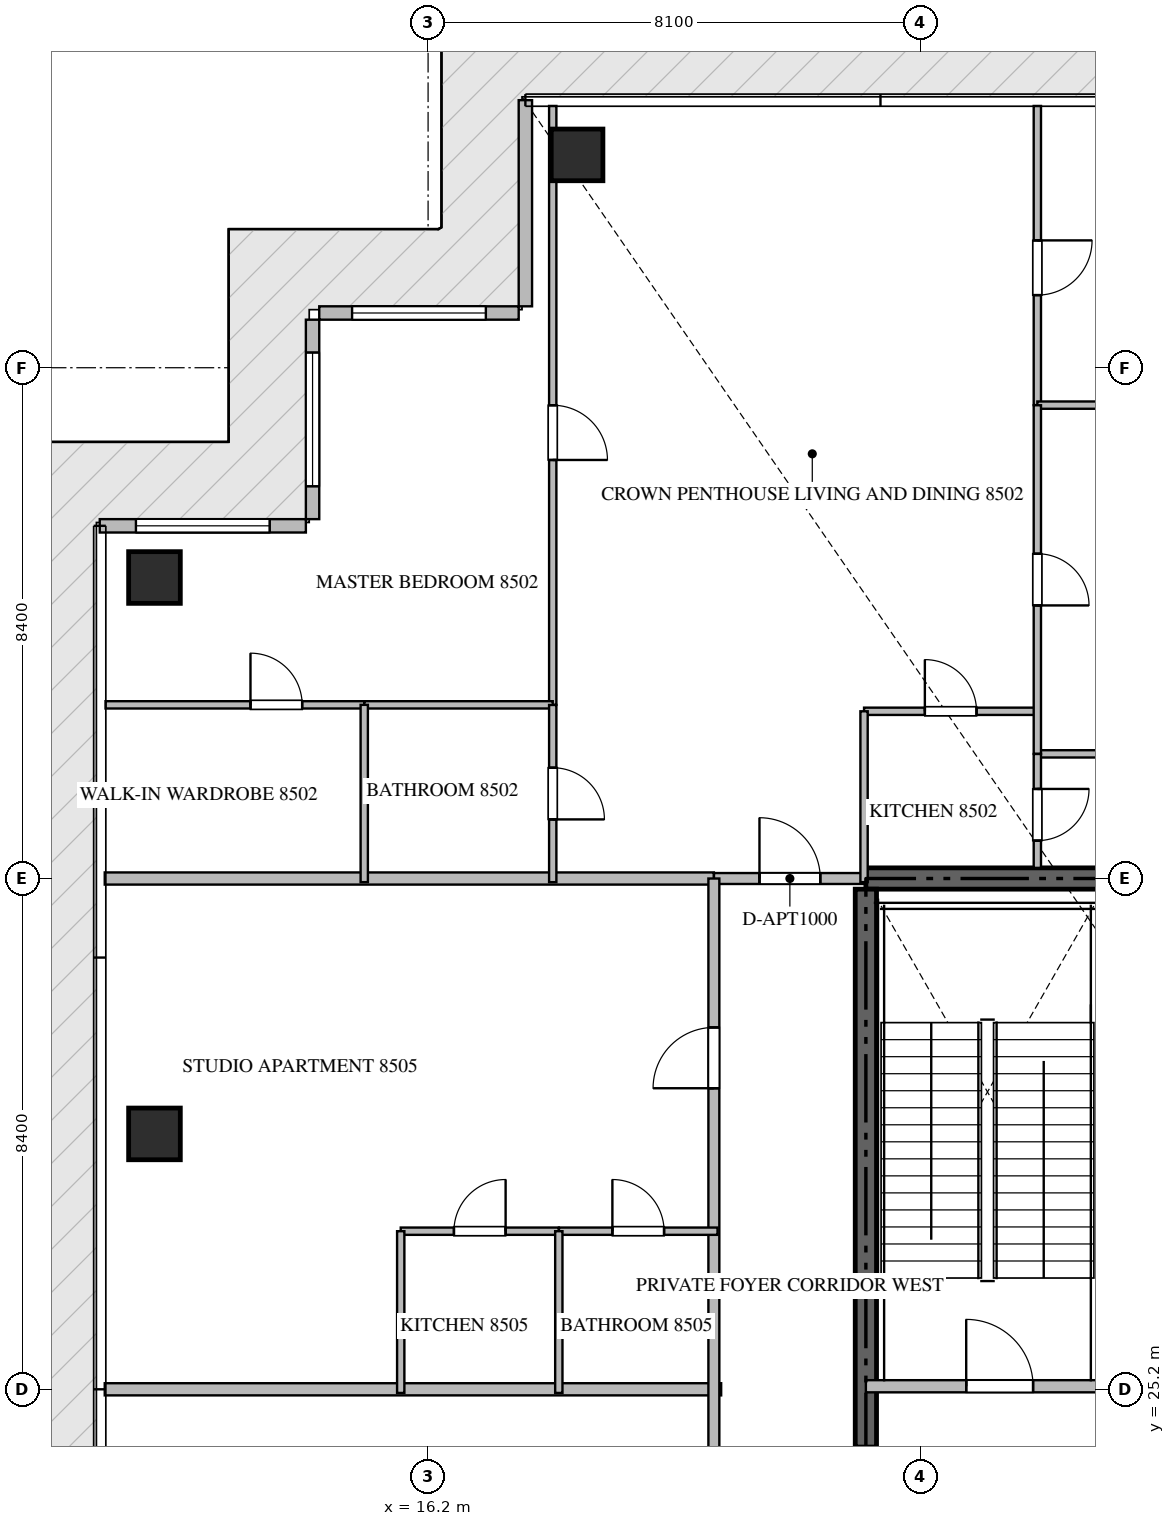
"""IFC4 building model, lengths in metres.
Left out: names, types, materials, properties, quantities, classifications, styles, units other than length and angle.
Written with IfcOpenShell. Run it as: python <this file> out.ifc"""

import sys

from ifc_helpers import new_model, si_unit, direction, frame, frame_2d, origin, origin_2d, place, context, subcontext, project, spatial, rectangle, extrude, source, transform, mapped, element, fill, save


model = new_model("IFC4")
c1 = context("Model", 3, precision=1e-05, world=origin(), true_north=direction((0.0, 1.0)))
c2 = subcontext(c1, "Body", "Model", "MODEL_VIEW")
j1 = project(units=[si_unit("LENGTHUNIT", "METRE"), si_unit("PLANEANGLEUNIT", "RADIAN")], contexts=[c1])
p1 = place(None, origin())
s1 = spatial("IfcSite", under=j1, at=p1, CompositionType="ELEMENT")
p2 = place(p1, origin())
s2 = spatial("IfcBuilding", under=s1, at=p2, CompositionType="ELEMENT")
p3 = place(p2, frame((0.0, 0.0, 342.05)))
s3 = spatial("IfcBuildingStorey", under=s2, at=p3, CompositionType="ELEMENT", Elevation=342.05)
p4 = place(p3, frame((41.4, 33.6, -0.26), z_axis=(0.0, 0.0, 1.0), x_axis=(-1.0, 0.0, 0.0)))
e1 = element("IfcWall", 1, at=p4, inside=s3, PredefinedType="SHEAR", context=c2, shape_type="SweptSolid", body=[
    extrude(rectangle(XDim=18.0, YDim=0.35, at=frame_2d((9.0, 0.0))), origin(), (0.0, 0.0, 1.0), 5.898),
])
p5 = place(p3, frame((23.4, 24.25, -0.26), z_axis=(0.0, 0.0, 1.0), x_axis=(0.0, 1.0, 0.0)))
e2 = element("IfcWall", 2, at=p5, inside=s3, PredefinedType="SHEAR", context=c2, shape_type="SweptSolid", body=[
    extrude(rectangle(XDim=9.175, YDim=0.35, at=frame_2d((4.587, 0.0))), origin(), (0.0, 0.0, 1.0), 5.898),
])
m1 = source(origin(), c2, "Body", "SweptSolid", [
    extrude(rectangle(XDim=0.85, YDim=0.85, at=origin_2d()), origin(), (0.0, 0.0, 1.0), 5.9),
])
for number, where, z_axis, x_axis in (
    (3, (18.65, 45.5, -0.26), (0.0, 0.0, 1.0), (1.0, 0.0, 0.0)),
    (4, (11.7, 29.4, -0.26), (0.0, 0.0, 1.0), (1.0, 0.0, 0.0)),
    (5, (11.7, 38.55, -0.26), (0.0, 0.0, 1.0), (1.0, 0.0, 0.0)),
):
    element("IfcColumn", number, at=place(p3, frame(where, z_axis=z_axis, x_axis=x_axis)), inside=s3, PredefinedType="COLUMN", context=c2, shape_type="MappedRepresentation", body=[
        mapped(m1, transform((0.0, 0.0, 0.0), scale=1.0)),
    ])
p6 = place(p3, frame((17.8, 46.4, 0.0), z_axis=(0.0, 0.0, 1.0), x_axis=(0.0, -1.0, 0.0)))
e6 = element("IfcWall", 6, at=p6, inside=s3, PredefinedType="ELEMENTEDWALL", context=c2, shape_type="SweptSolid", body=[
    extrude(rectangle(XDim=3.39, YDim=0.22, at=frame_2d((1.695, 0.0))), origin(), (0.0, 0.0, 1.0), 5.625),
])
p7 = place(p3, frame((17.69, 42.9, 0.0), z_axis=(0.0, 0.0, 1.0), x_axis=(-1.0, 0.0, 0.0)))
e7 = element("IfcWall", 7, at=p7, inside=s3, PredefinedType="ELEMENTEDWALL", context=c2, shape_type="SweptSolid", body=[
    extrude(rectangle(XDim=3.28, YDim=0.22, at=frame_2d((1.64, 0.0))), origin(), (0.0, 0.0, 1.0), 5.625),
])
p8 = place(p7, frame((0.54, 0.0, 0.65)))
e8 = element("IfcOpeningElement", 8, at=p8, cuts=e7, PredefinedType="OPENING", context=c2, shape_type="SweptSolid", body=[
    extrude(rectangle(XDim=2.2, YDim=2.4, at=frame_2d((1.1, 1.2))), frame((0.0, 0.12, 0.0), z_axis=(0.0, -1.0, 0.0), x_axis=(1.0, 0.0, 0.0)), (0.0, 0.0, 1.0), 0.24),
])
p9 = place(p3, frame((14.3, 42.79, 0.0), z_axis=(0.0, 0.0, 1.0), x_axis=(0.0, -1.0, 0.0)))
e9 = element("IfcWall", 9, at=p9, inside=s3, PredefinedType="ELEMENTEDWALL", context=c2, shape_type="SweptSolid", body=[
    extrude(rectangle(XDim=3.28, YDim=0.22, at=frame_2d((1.64, 0.0))), origin(), (0.0, 0.0, 1.0), 5.625),
])
p10 = place(p9, frame((0.54, 0.0, 0.65)))
e10 = element("IfcOpeningElement", 10, at=p10, cuts=e9, PredefinedType="OPENING", context=c2, shape_type="SweptSolid", body=[
    extrude(rectangle(XDim=2.2, YDim=2.4, at=frame_2d((1.1, 1.2))), frame((0.0, 0.12, 0.0), z_axis=(0.0, -1.0, 0.0), x_axis=(1.0, 0.0, 0.0)), (0.0, 0.0, 1.0), 0.24),
])
p11 = place(p3, frame((14.19, 39.4, 0.0), z_axis=(0.0, 0.0, 1.0), x_axis=(-1.0, 0.0, 0.0)))
e11 = element("IfcWall", 11, at=p11, inside=s3, PredefinedType="ELEMENTEDWALL", context=c2, shape_type="SweptSolid", body=[
    extrude(rectangle(XDim=3.39, YDim=0.22, at=frame_2d((1.695, 0.0))), origin(), (0.0, 0.0, 1.0), 5.625),
])
p12 = place(p11, frame((0.595, 0.0, 0.65)))
e12 = element("IfcOpeningElement", 12, at=p12, cuts=e11, PredefinedType="OPENING", context=c2, shape_type="SweptSolid", body=[
    extrude(rectangle(XDim=2.2, YDim=2.4, at=frame_2d((1.1, 1.2))), frame((0.0, 0.12, 0.0), z_axis=(0.0, -1.0, 0.0), x_axis=(1.0, 0.0, 0.0)), (0.0, 0.0, 1.0), 0.24),
])
p13 = place(p3, frame((23.4, 25.25, 0.0), z_axis=(0.0, 0.0, 1.0), x_axis=(1.0, 0.0, 0.0)))
e13 = element("IfcWall", 13, at=p13, inside=s3, PredefinedType="STANDARD", context=c2, shape_type="SweptSolid", body=[
    extrude(rectangle(XDim=4.45, YDim=0.2, at=frame_2d((2.225, 0.0))), origin(), (0.0, 0.0, 1.0), 5.64),
])
p14 = place(p13, frame((1.65, 0.0, 0.0)))
e14 = element("IfcOpeningElement", 14, at=p14, cuts=e13, PredefinedType="OPENING", context=c2, shape_type="SweptSolid", body=[
    extrude(rectangle(XDim=1.1, YDim=2.15, at=frame_2d((0.55, 1.075))), frame((0.0, 0.11, 0.0), z_axis=(0.0, -1.0, 0.0), x_axis=(1.0, 0.0, 0.0)), (0.0, 0.0, 1.0), 0.22),
])
p15 = place(p3, frame((10.882, 25.2, 0.0), z_axis=(0.0, 0.0, 1.0), x_axis=(1.0, 0.0, 0.0)))
e15 = element("IfcWall", 15, at=p15, inside=s3, PredefinedType="PARTITIONING", context=c2, shape_type="SweptSolid", body=[
    extrude(rectangle(XDim=10.138, YDim=0.2, at=frame_2d((5.069, 0.0))), origin(), (0.0, 0.0, 1.0), 5.64),
])
p16 = place(p3, frame((10.882, 33.6, 0.0), z_axis=(0.0, 0.0, 1.0), x_axis=(1.0, 0.0, 0.0)))
e16 = element("IfcWall", 16, at=p16, inside=s3, PredefinedType="PARTITIONING", context=c2, shape_type="SweptSolid", body=[
    extrude(rectangle(XDim=10.018, YDim=0.2, at=frame_2d((5.009, 0.0))), origin(), (0.0, 0.0, 1.0), 5.64),
])
p17 = place(p3, frame((20.902, 33.6, 0.0), z_axis=(0.0, 0.0, 1.0), x_axis=(1.0, 0.0, 0.0)))
e17 = element("IfcWall", 17, at=p17, inside=s3, PredefinedType="PARTITIONING", context=c2, shape_type="SweptSolid", body=[
    extrude(rectangle(XDim=2.496, YDim=0.18, at=frame_2d((1.248, 0.0))), origin(), (0.0, 0.0, 1.0), 5.64),
])
p18 = place(p17, frame((0.748, 0.0, 0.0)))
e18 = element("IfcOpeningElement", 18, at=p18, cuts=e17, PredefinedType="OPENING", context=c2, shape_type="SweptSolid", body=[
    extrude(rectangle(XDim=1.0, YDim=2.15, at=frame_2d((0.5, 1.075))), frame((0.0, 0.1, 0.0), z_axis=(0.0, -1.0, 0.0), x_axis=(1.0, 0.0, 0.0)), (0.0, 0.0, 1.0), 0.2),
])
p19 = place(p3, frame((20.9, 16.8, 0.0), z_axis=(0.0, 0.0, 1.0), x_axis=(0.0, 1.0, 0.0)))
e19 = element("IfcWall", 19, at=p19, inside=s3, PredefinedType="PARTITIONING", context=c2, shape_type="SweptSolid", body=[
    extrude(rectangle(XDim=16.8, YDim=0.18, at=frame_2d((8.4, 0.0))), origin(), (0.0, 0.0, 1.0), 5.64),
])
p20 = place(p19, frame((4.993, 0.0, 0.0)))
e20 = element("IfcOpeningElement", 20, at=p20, cuts=e19, PredefinedType="OPENING", context=c2, shape_type="SweptSolid", body=[
    extrude(rectangle(XDim=1.0, YDim=2.15, at=frame_2d((0.5, 1.075))), frame((0.0, 0.1, 0.0), z_axis=(0.0, -1.0, 0.0), x_axis=(1.0, 0.0, 0.0)), (0.0, 0.0, 1.0), 0.2),
])
p21 = place(p19, frame((13.351, 0.0, 0.0)))
e21 = element("IfcOpeningElement", 21, at=p21, cuts=e19, PredefinedType="OPENING", context=c2, shape_type="SweptSolid", body=[
    extrude(rectangle(XDim=1.0, YDim=2.15, at=frame_2d((0.5, 1.075))), frame((0.0, 0.1, 0.0), z_axis=(0.0, -1.0, 0.0), x_axis=(1.0, 0.0, 0.0)), (0.0, 0.0, 1.0), 0.2),
])
p22 = place(p3, frame((23.37, 36.35, 0.0), z_axis=(0.0, 0.0, 1.0), x_axis=(1.0, 0.0, 0.0)))
e22 = element("IfcWall", 22, at=p22, inside=s3, PredefinedType="PARTITIONING", context=c2, shape_type="SweptSolid", body=[
    extrude(rectangle(XDim=2.85, YDim=0.12, at=frame_2d((1.425, 0.0))), origin(), (0.0, 0.0, 1.0), 5.64),
])
p23 = place(p22, frame((1.0, 0.0, 0.0)))
e23 = element("IfcOpeningElement", 23, at=p23, cuts=e22, PredefinedType="OPENING", context=c2, shape_type="SweptSolid", body=[
    extrude(rectangle(XDim=0.85, YDim=2.1, at=frame_2d((0.425, 1.05))), frame((0.0, 0.07, 0.0), z_axis=(0.0, -1.0, 0.0), x_axis=(1.0, 0.0, 0.0)), (0.0, 0.0, 1.0), 0.14),
])
p24 = place(p3, frame((23.37, 36.35, 0.0), z_axis=(0.0, 0.0, 1.0), x_axis=(0.0, -1.0, 0.0)))
e24 = element("IfcWall", 24, at=p24, inside=s3, PredefinedType="PARTITIONING", context=c2, shape_type="SweptSolid", body=[
    extrude(rectangle(XDim=2.81, YDim=0.12, at=frame_2d((1.405, 0.0))), origin(), (0.0, 0.0, 1.0), 5.64),
])
p25 = place(p3, frame((18.25, 46.305, 0.0), z_axis=(0.0, 0.0, 1.0), x_axis=(0.0, -1.0, 0.0)))
e25 = element("IfcWall", 25, at=p25, inside=s3, PredefinedType="PARTITIONING", context=c2, shape_type="SweptSolid", body=[
    extrude(rectangle(XDim=9.849, YDim=0.12, at=frame_2d((4.924, 0.0))), origin(), (0.0, 0.0, 1.0), 5.64),
])
p26 = place(p25, frame((4.922, 0.0, 0.0)))
e26 = element("IfcOpeningElement", 26, at=p26, cuts=e25, PredefinedType="OPENING", context=c2, shape_type="SweptSolid", body=[
    extrude(rectangle(XDim=0.9, YDim=2.1, at=frame_2d((0.45, 1.05))), frame((0.0, 0.07, 0.0), z_axis=(0.0, -1.0, 0.0), x_axis=(1.0, 0.0, 0.0)), (0.0, 0.0, 1.0), 0.14),
])
p27 = place(p3, frame((10.895, 36.456, 0.0), z_axis=(0.0, 0.0, 1.0), x_axis=(1.0, 0.0, 0.0)))
e27 = element("IfcWall", 27, at=p27, inside=s3, PredefinedType="PARTITIONING", context=c2, shape_type="SweptSolid", body=[
    extrude(rectangle(XDim=4.255, YDim=0.12, at=frame_2d((2.127, 0.0))), origin(), (0.0, 0.0, 1.0), 5.64),
])
p28 = place(p27, frame((2.384, 0.0, 0.0)))
e28 = element("IfcOpeningElement", 28, at=p28, cuts=e27, PredefinedType="OPENING", context=c2, shape_type="SweptSolid", body=[
    extrude(rectangle(XDim=0.85, YDim=2.1, at=frame_2d((0.425, 1.05))), frame((0.0, 0.07, 0.0), z_axis=(0.0, -1.0, 0.0), x_axis=(1.0, 0.0, 0.0)), (0.0, 0.0, 1.0), 0.14),
])
p29 = place(p3, frame((15.152, 36.456, 0.0), z_axis=(0.0, 0.0, 1.0), x_axis=(1.0, 0.0, 0.0)))
e29 = element("IfcWall", 29, at=p29, inside=s3, PredefinedType="PARTITIONING", context=c2, shape_type="SweptSolid", body=[
    extrude(rectangle(XDim=3.098, YDim=0.12, at=frame_2d((1.549, 0.0))), origin(), (0.0, 0.0, 1.0), 5.64),
])
p30 = place(p3, frame((15.15, 36.456, 0.0), z_axis=(0.0, 0.0, 1.0), x_axis=(0.0, -1.0, 0.0)))
e30 = element("IfcWall", 30, at=p30, inside=s3, PredefinedType="PARTITIONING", context=c2, shape_type="SweptSolid", body=[
    extrude(rectangle(XDim=2.916, YDim=0.12, at=frame_2d((1.458, 0.0))), origin(), (0.0, 0.0, 1.0), 5.64),
])
p31 = place(p3, frame((18.25, 36.454, 0.0), z_axis=(0.0, 0.0, 1.0), x_axis=(0.0, -1.0, 0.0)))
e31 = element("IfcWall", 31, at=p31, inside=s3, PredefinedType="PARTITIONING", context=c2, shape_type="SweptSolid", body=[
    extrude(rectangle(XDim=2.914, YDim=0.12, at=frame_2d((1.457, 0.0))), origin(), (0.0, 0.0, 1.0), 5.64),
])
p32 = place(p31, frame((1.032, 0.0, 0.0)))
e32 = element("IfcOpeningElement", 32, at=p32, cuts=e31, PredefinedType="OPENING", context=c2, shape_type="SweptSolid", body=[
    extrude(rectangle(XDim=0.85, YDim=2.1, at=frame_2d((0.425, 1.05))), frame((0.0, 0.07, 0.0), z_axis=(0.0, -1.0, 0.0), x_axis=(1.0, 0.0, 0.0)), (0.0, 0.0, 1.0), 0.14),
])
p33 = place(p3, frame((26.22, 46.305, 0.0), z_axis=(0.0, 0.0, 1.0), x_axis=(0.0, -1.0, 0.0)))
e33 = element("IfcWall", 33, at=p33, inside=s3, PredefinedType="PARTITIONING", context=c2, shape_type="SweptSolid", body=[
    extrude(rectangle(XDim=4.92, YDim=0.12, at=frame_2d((2.46, 0.0))), origin(), (0.0, 0.0, 1.0), 5.64),
])
p34 = place(p33, frame((2.211, 0.0, 0.0)))
e34 = element("IfcOpeningElement", 34, at=p34, cuts=e33, PredefinedType="OPENING", context=c2, shape_type="SweptSolid", body=[
    extrude(rectangle(XDim=0.9, YDim=2.1, at=frame_2d((0.45, 1.05))), frame((0.0, 0.07, 0.0), z_axis=(0.0, -1.0, 0.0), x_axis=(1.0, 0.0, 0.0)), (0.0, 0.0, 1.0), 0.14),
])
for number, where, z_axis, x_axis in (
    (35, (26.22, 41.385, 0.0), (0.0, 0.0, 1.0), (1.0, 0.0, 0.0)),
    (36, (26.22, 35.65, 0.0), (0.0, 0.0, 1.0), (1.0, 0.0, 0.0)),
):
    element("IfcWall", number, at=place(p3, frame(where, z_axis=z_axis, x_axis=x_axis)), inside=s3, PredefinedType="PARTITIONING", context=c2, shape_type="SweptSolid", body=[
        extrude(rectangle(XDim=6.24, YDim=0.12, at=frame_2d((3.12, 0.0))), origin(), (0.0, 0.0, 1.0), 5.64),
    ])
p35 = place(p3, frame((26.22, 41.383, 0.0), z_axis=(0.0, 0.0, 1.0), x_axis=(0.0, -1.0, 0.0)))
e37 = element("IfcWall", 37, at=p35, inside=s3, PredefinedType="PARTITIONING", context=c2, shape_type="SweptSolid", body=[
    extrude(rectangle(XDim=5.733, YDim=0.12, at=frame_2d((2.867, 0.0))), origin(), (0.0, 0.0, 1.0), 5.64),
])
p36 = place(p35, frame((2.442, 0.0, 0.0)))
e38 = element("IfcOpeningElement", 38, at=p36, cuts=e37, PredefinedType="OPENING", context=c2, shape_type="SweptSolid", body=[
    extrude(rectangle(XDim=0.85, YDim=2.1, at=frame_2d((0.425, 1.05))), frame((0.0, 0.07, 0.0), z_axis=(0.0, -1.0, 0.0), x_axis=(1.0, 0.0, 0.0)), (0.0, 0.0, 1.0), 0.14),
])
p37 = place(p3, frame((26.22, 35.648, 0.0), z_axis=(0.0, 0.0, 1.0), x_axis=(0.0, -1.0, 0.0)))
e39 = element("IfcWall", 39, at=p37, inside=s3, PredefinedType="PARTITIONING", context=c2, shape_type="SweptSolid", body=[
    extrude(rectangle(XDim=1.873, YDim=0.12, at=frame_2d((0.937, 0.0))), origin(), (0.0, 0.0, 1.0), 5.64),
])
p38 = place(p37, frame((0.575, 0.0, 0.0)))
e40 = element("IfcOpeningElement", 40, at=p38, cuts=e39, PredefinedType="OPENING", context=c2, shape_type="SweptSolid", body=[
    extrude(rectangle(XDim=0.85, YDim=2.1, at=frame_2d((0.425, 1.05))), frame((0.0, 0.07, 0.0), z_axis=(0.0, -1.0, 0.0), x_axis=(1.0, 0.0, 0.0)), (0.0, 0.0, 1.0), 0.14),
])
p39 = place(p3, frame((15.75, 27.8, 0.0), z_axis=(0.0, 0.0, 1.0), x_axis=(1.0, 0.0, 0.0)))
e41 = element("IfcWall", 41, at=p39, inside=s3, PredefinedType="PARTITIONING", context=c2, shape_type="SweptSolid", body=[
    extrude(rectangle(XDim=2.6, YDim=0.12, at=frame_2d((1.3, 0.0))), origin(), (0.0, 0.0, 1.0), 5.64),
])
p40 = place(p39, frame((0.875, 0.0, 0.0)))
e42 = element("IfcOpeningElement", 42, at=p40, cuts=e41, PredefinedType="OPENING", context=c2, shape_type="SweptSolid", body=[
    extrude(rectangle(XDim=0.85, YDim=2.1, at=frame_2d((0.425, 1.05))), frame((0.0, 0.07, 0.0), z_axis=(0.0, -1.0, 0.0), x_axis=(1.0, 0.0, 0.0)), (0.0, 0.0, 1.0), 0.14),
])
p41 = place(p3, frame((18.352, 27.8, 0.0), z_axis=(0.0, 0.0, 1.0), x_axis=(1.0, 0.0, 0.0)))
e43 = element("IfcWall", 43, at=p41, inside=s3, PredefinedType="PARTITIONING", context=c2, shape_type="SweptSolid", body=[
    extrude(rectangle(XDim=2.608, YDim=0.12, at=frame_2d((1.304, 0.0))), origin(), (0.0, 0.0, 1.0), 5.64),
])
p42 = place(p41, frame((0.879, 0.0, 0.0)))
e44 = element("IfcOpeningElement", 44, at=p42, cuts=e43, PredefinedType="OPENING", context=c2, shape_type="SweptSolid", body=[
    extrude(rectangle(XDim=0.85, YDim=2.1, at=frame_2d((0.425, 1.05))), frame((0.0, 0.07, 0.0), z_axis=(0.0, -1.0, 0.0), x_axis=(1.0, 0.0, 0.0)), (0.0, 0.0, 1.0), 0.14),
])
for number, where, z_axis, x_axis in (
    (45, (18.35, 25.14, 0.0), (0.0, 0.0, 1.0), (0.0, 1.0, 0.0)),
    (46, (15.75, 25.14, 0.0), (0.0, 0.0, 1.0), (0.0, 1.0, 0.0)),
):
    element("IfcWall", number, at=place(p3, frame(where, z_axis=z_axis, x_axis=x_axis)), inside=s3, PredefinedType="PARTITIONING", context=c2, shape_type="SweptSolid", body=[
        extrude(rectangle(XDim=2.66, YDim=0.12, at=frame_2d((1.33, 0.0))), origin(), (0.0, 0.0, 1.0), 5.64),
    ])
m2 = source(origin(), c2, "Body", "SweptSolid", [
    extrude(rectangle(XDim=2.2, YDim=2.4, at=frame_2d((1.1, 1.2))), frame((0.0, 0.03, 0.0), z_axis=(0.0, -1.0, 0.0), x_axis=(1.0, 0.0, 0.0)), (0.0, 0.0, 1.0), 0.06),
])
p43 = place(p8, origin())
e47 = element("IfcWindow", 47, at=p43, inside=s3, PartitioningType="SINGLE_PANEL", PredefinedType="WINDOW", context=c2, shape_type="MappedRepresentation", body=[
    mapped(m2, transform((0.0, 0.0, 0.0), scale=1.0)),
])
fill(e8, e47)
p44 = place(p10, origin())
e48 = element("IfcWindow", 48, at=p44, inside=s3, PartitioningType="SINGLE_PANEL", PredefinedType="WINDOW", context=c2, shape_type="MappedRepresentation", body=[
    mapped(m2, transform((0.0, 0.0, 0.0), scale=1.0)),
])
fill(e10, e48)
p45 = place(p12, origin())
e49 = element("IfcWindow", 49, at=p45, inside=s3, PartitioningType="SINGLE_PANEL", PredefinedType="WINDOW", context=c2, shape_type="MappedRepresentation", body=[
    mapped(m2, transform((0.0, 0.0, 0.0), scale=1.0)),
])
fill(e12, e49)
m3 = source(origin(), c2, "Body", "SweptSolid", [
    extrude(rectangle(XDim=1.1, YDim=2.15, at=frame_2d((0.55, 1.075))), frame((0.0, 0.025, 0.0), z_axis=(0.0, -1.0, 0.0), x_axis=(1.0, 0.0, 0.0)), (0.0, 0.0, 1.0), 0.05),
])
p46 = place(p14, origin())
e50 = element("IfcDoor", 50, at=p46, inside=s3, OperationType="SINGLE_SWING_LEFT", PredefinedType="DOOR", context=c2, shape_type="MappedRepresentation", body=[
    mapped(m3, transform((0.0, 0.0, 0.0), scale=1.0)),
])
fill(e14, e50)
m4 = source(origin(), c2, "Body", "SweptSolid", [
    extrude(rectangle(XDim=1.0, YDim=2.15, at=frame_2d((0.5, 1.075))), frame((0.0, 0.025, 0.0), z_axis=(0.0, -1.0, 0.0), x_axis=(1.0, 0.0, 0.0)), (0.0, 0.0, 1.0), 0.05),
])
p47 = place(p18, origin())
e51 = element("IfcDoor", 51, at=p47, inside=s3, OperationType="SINGLE_SWING_LEFT", PredefinedType="DOOR", context=c2, shape_type="MappedRepresentation", body=[
    mapped(m4, transform((0.0, 0.0, 0.0), scale=1.0)),
])
fill(e18, e51)
p48 = place(p21, origin())
e52 = element("IfcDoor", 52, at=p48, inside=s3, OperationType="SINGLE_SWING_LEFT", PredefinedType="DOOR", context=c2, shape_type="MappedRepresentation", body=[
    mapped(m4, transform((0.0, 0.0, 0.0), scale=1.0)),
])
fill(e21, e52)
m5 = source(origin(), c2, "Body", "SweptSolid", [
    extrude(rectangle(XDim=0.85, YDim=2.1, at=frame_2d((0.425, 1.05))), frame((0.0, 0.025, 0.0), z_axis=(0.0, -1.0, 0.0), x_axis=(1.0, 0.0, 0.0)), (0.0, 0.0, 1.0), 0.05),
])
p49 = place(p23, origin())
e53 = element("IfcDoor", 53, at=p49, inside=s3, OperationType="SINGLE_SWING_LEFT", PredefinedType="DOOR", context=c2, shape_type="MappedRepresentation", body=[
    mapped(m5, transform((0.0, 0.0, 0.0), scale=1.0)),
])
fill(e23, e53)
m6 = source(origin(), c2, "Body", "SweptSolid", [
    extrude(rectangle(XDim=0.9, YDim=2.1, at=frame_2d((0.45, 1.05))), frame((0.0, 0.025, 0.0), z_axis=(0.0, -1.0, 0.0), x_axis=(1.0, 0.0, 0.0)), (0.0, 0.0, 1.0), 0.05),
])
p50 = place(p26, origin())
e54 = element("IfcDoor", 54, at=p50, inside=s3, OperationType="SINGLE_SWING_RIGHT", PredefinedType="DOOR", context=c2, shape_type="MappedRepresentation", body=[
    mapped(m6, transform((0.0, 0.0, 0.0), scale=1.0)),
])
fill(e26, e54)
p51 = place(p28, origin())
e55 = element("IfcDoor", 55, at=p51, inside=s3, OperationType="SINGLE_SWING_LEFT", PredefinedType="DOOR", context=c2, shape_type="MappedRepresentation", body=[
    mapped(m5, transform((0.0, 0.0, 0.0), scale=1.0)),
])
fill(e28, e55)
p52 = place(p32, origin())
e56 = element("IfcDoor", 56, at=p52, inside=s3, OperationType="SINGLE_SWING_RIGHT", PredefinedType="DOOR", context=c2, shape_type="MappedRepresentation", body=[
    mapped(m5, transform((0.0, 0.0, 0.0), scale=1.0)),
])
fill(e32, e56)
p53 = place(p34, origin())
e57 = element("IfcDoor", 57, at=p53, inside=s3, OperationType="SINGLE_SWING_LEFT", PredefinedType="DOOR", context=c2, shape_type="MappedRepresentation", body=[
    mapped(m6, transform((0.0, 0.0, 0.0), scale=1.0)),
])
fill(e34, e57)
p54 = place(p36, origin())
e58 = element("IfcDoor", 58, at=p54, inside=s3, OperationType="SINGLE_SWING_RIGHT", PredefinedType="DOOR", context=c2, shape_type="MappedRepresentation", body=[
    mapped(m5, transform((0.0, 0.0, 0.0), scale=1.0)),
])
fill(e38, e58)
p55 = place(p38, origin())
e59 = element("IfcDoor", 59, at=p55, inside=s3, OperationType="SINGLE_SWING_LEFT", PredefinedType="DOOR", context=c2, shape_type="MappedRepresentation", body=[
    mapped(m5, transform((0.0, 0.0, 0.0), scale=1.0)),
])
fill(e40, e59)
p56 = place(p40, origin())
e60 = element("IfcDoor", 60, at=p56, inside=s3, OperationType="SINGLE_SWING_RIGHT", PredefinedType="DOOR", context=c2, shape_type="MappedRepresentation", body=[
    mapped(m5, transform((0.0, 0.0, 0.0), scale=1.0)),
])
fill(e42, e60)
p57 = place(p42, origin())
e61 = element("IfcDoor", 61, at=p57, inside=s3, OperationType="SINGLE_SWING_LEFT", PredefinedType="DOOR", context=c2, shape_type="MappedRepresentation", body=[
    mapped(m5, transform((0.0, 0.0, 0.0), scale=1.0)),
])
fill(e44, e61)
save(model, sys.argv[1])
